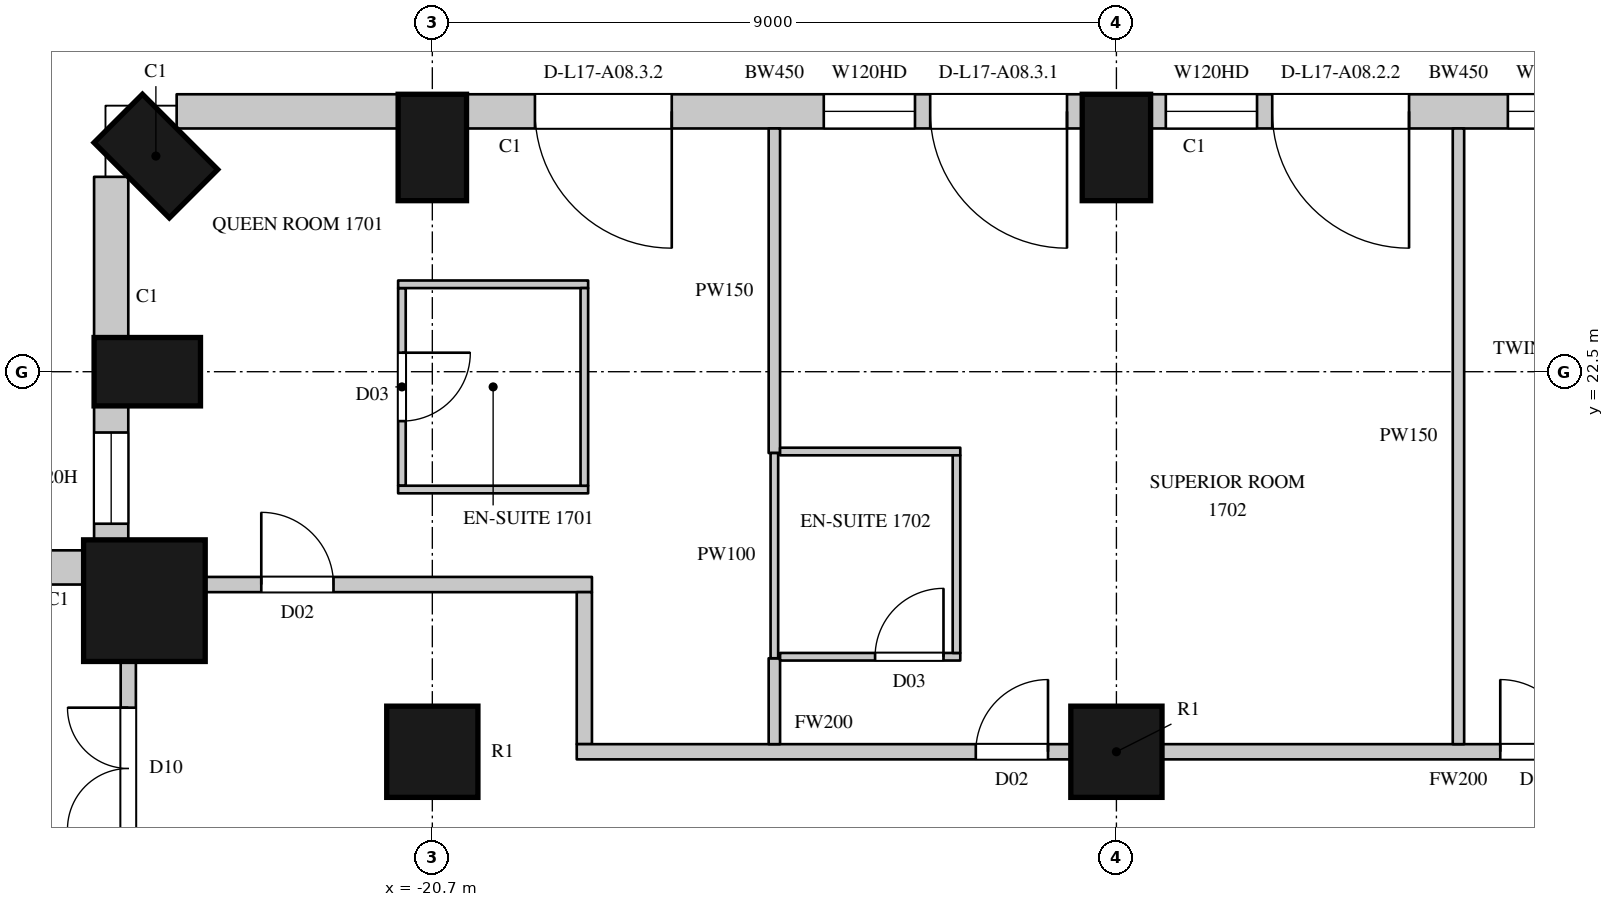
"""IFC4 building model, lengths in metres.
Left out: names, types, materials, properties, quantities, classifications, styles, units other than length and angle.
Written with IfcOpenShell. Run it as: python <this file> out.ifc"""

import sys

from ifc_helpers import new_model, si_unit, direction, frame, frame_2d, origin, origin_2d, place, context, subcontext, project, spatial, rectangle, circle, extrude, element, fill, save


model = new_model("IFC4")
c1 = context("Model", 3, precision=1e-05, world=origin(), true_north=direction((0.0, 1.0)))
c2 = subcontext(c1, "Body", "Model", "MODEL_VIEW")
j1 = project(units=[si_unit("LENGTHUNIT", "METRE"), si_unit("PLANEANGLEUNIT", "RADIAN")], contexts=[c1])
p1 = place(None, origin())
s1 = spatial("IfcSite", under=j1, at=p1, CompositionType="ELEMENT")
p2 = place(p1, origin())
s2 = spatial("IfcBuilding", under=s1, at=p2, CompositionType="ELEMENT")
p3 = place(p2, frame((0.0, 0.0, 91.5)))
s3 = spatial("IfcBuildingStorey", under=s2, at=p3, CompositionType="ELEMENT", Elevation=91.5)
for number, where, z_axis, x_axis in (
    (1, (-11.7, 25.45, 0.0), (0.0, 0.0, 1.0), (-1.0, 0.0, 0.0)),
    (2, (-20.7, 25.45, 0.0), (0.0, 0.0, 1.0), (-1.0, 0.0, 0.0)),
    (3, (-24.337, 25.337, 0.0), (0.0, 0.0, 1.0), (-0.707, -0.707, 0.0)),
    (4, (-24.45, 22.5, 0.0), (0.0, 0.0, 1.0), (0.0, -1.0, 0.0)),
):
    element("IfcColumn", number, at=place(p3, frame(where, z_axis=z_axis, x_axis=x_axis)), inside=s3, PredefinedType="COLUMN", context=c2, shape_type="SweptSolid", body=[
        extrude(rectangle(XDim=0.9, YDim=1.4, at=origin_2d()), origin(), (0.0, 0.0, 1.0), 3.6),
    ])
p4 = place(p3, frame((-24.488, 19.488, 0.0), z_axis=(0.0, 0.0, 1.0), x_axis=(1.0, 0.0, 0.0)))
e5 = element("IfcColumn", 5, at=p4, inside=s3, PredefinedType="COLUMN", context=c2, shape_type="SweptSolid", body=[
    extrude(circle(Radius=0.8, at=origin_2d()), origin(), (0.0, 0.0, 1.0), 3.6),
])
for number, where, z_axis, x_axis in (
    (6, (-20.7, 17.5, 0.0), (0.0, 0.0, 1.0), (1.0, 0.0, 0.0)),
    (7, (-11.7, 17.5, 0.0), (0.0, 0.0, 1.0), (1.0, 0.0, 0.0)),
):
    element("IfcColumn", number, at=place(p3, frame(where, z_axis=z_axis, x_axis=x_axis)), inside=s3, PredefinedType="COLUMN", context=c2, shape_type="SweptSolid", body=[
        extrude(circle(Radius=0.6, at=origin_2d()), origin(), (0.0, 0.0, 1.0), 3.6),
    ])
p5 = place(p3, frame((-3.15, 25.925, 0.0), z_axis=(0.0, 0.0, 1.0), x_axis=(-1.0, 0.0, 0.0)))
e8 = element("IfcWall", 8, at=p5, inside=s3, PredefinedType="SOLIDWALL", context=c2, shape_type="SweptSolid", body=[
    extrude(rectangle(XDim=8.1, YDim=0.45, at=frame_2d((4.05, 0.0))), origin(), (0.0, 0.0, 1.0), 3.3),
])
p6 = place(p5, frame((0.2, 0.0, 0.0)))
e9 = element("IfcOpeningElement", 9, at=p6, cuts=e8, PredefinedType="OPENING", context=c2, shape_type="SweptSolid", body=[
    extrude(rectangle(XDim=1.8, YDim=2.4, at=frame_2d((0.9, 1.2))), frame((0.0, 0.235, 0.0), z_axis=(0.0, -1.0, 0.0), x_axis=(1.0, 0.0, 0.0)), (0.0, 0.0, 1.0), 0.47),
])
p7 = place(p5, frame((2.2, 0.0, 1.05)))
e10 = element("IfcOpeningElement", 10, at=p7, cuts=e8, PredefinedType="OPENING", context=c2, shape_type="SweptSolid", body=[
    extrude(rectangle(XDim=1.2, YDim=2.0, at=frame_2d((0.6, 1.0))), frame((0.0, 0.235, 0.0), z_axis=(0.0, -1.0, 0.0), x_axis=(1.0, 0.0, 0.0)), (0.0, 0.0, 1.0), 0.47),
])
p8 = place(p5, frame((4.7, 0.0, 0.0)))
e11 = element("IfcOpeningElement", 11, at=p8, cuts=e8, PredefinedType="OPENING", context=c2, shape_type="SweptSolid", body=[
    extrude(rectangle(XDim=1.8, YDim=2.4, at=frame_2d((0.9, 1.2))), frame((0.0, 0.235, 0.0), z_axis=(0.0, -1.0, 0.0), x_axis=(1.0, 0.0, 0.0)), (0.0, 0.0, 1.0), 0.47),
])
p9 = place(p5, frame((6.7, 0.0, 1.05)))
e12 = element("IfcOpeningElement", 12, at=p9, cuts=e8, PredefinedType="OPENING", context=c2, shape_type="SweptSolid", body=[
    extrude(rectangle(XDim=1.2, YDim=2.0, at=frame_2d((0.6, 1.0))), frame((0.0, 0.235, 0.0), z_axis=(0.0, -1.0, 0.0), x_axis=(1.0, 0.0, 0.0)), (0.0, 0.0, 1.0), 0.47),
])
p10 = place(p3, frame((-12.15, 25.925, 0.0), z_axis=(0.0, 0.0, 1.0), x_axis=(-1.0, 0.0, 0.0)))
e13 = element("IfcWall", 13, at=p10, inside=s3, PredefinedType="SOLIDWALL", context=c2, shape_type="SweptSolid", body=[
    extrude(rectangle(XDim=8.1, YDim=0.45, at=frame_2d((4.05, 0.0))), origin(), (0.0, 0.0, 1.0), 3.3),
])
p11 = place(p10, frame((0.2, 0.0, 0.0)))
e14 = element("IfcOpeningElement", 14, at=p11, cuts=e13, PredefinedType="OPENING", context=c2, shape_type="SweptSolid", body=[
    extrude(rectangle(XDim=1.8, YDim=2.4, at=frame_2d((0.9, 1.2))), frame((0.0, 0.235, 0.0), z_axis=(0.0, -1.0, 0.0), x_axis=(1.0, 0.0, 0.0)), (0.0, 0.0, 1.0), 0.47),
])
p12 = place(p10, frame((2.2, 0.0, 1.05)))
e15 = element("IfcOpeningElement", 15, at=p12, cuts=e13, PredefinedType="OPENING", context=c2, shape_type="SweptSolid", body=[
    extrude(rectangle(XDim=1.2, YDim=2.0, at=frame_2d((0.6, 1.0))), frame((0.0, 0.235, 0.0), z_axis=(0.0, -1.0, 0.0), x_axis=(1.0, 0.0, 0.0)), (0.0, 0.0, 1.0), 0.47),
])
p13 = place(p10, frame((5.4, 0.0, 0.0)))
e16 = element("IfcOpeningElement", 16, at=p13, cuts=e13, PredefinedType="OPENING", context=c2, shape_type="SweptSolid", body=[
    extrude(rectangle(XDim=1.8, YDim=2.4, at=frame_2d((0.9, 1.2))), frame((0.0, 0.235, 0.0), z_axis=(0.0, -1.0, 0.0), x_axis=(1.0, 0.0, 0.0)), (0.0, 0.0, 1.0), 0.47),
])
p14 = place(p3, frame((-21.15, 25.925, 0.0), z_axis=(0.0, 0.0, 1.0), x_axis=(-1.0, 0.0, 0.0)))
e17 = element("IfcWall", 17, at=p14, inside=s3, PredefinedType="SOLIDWALL", context=c2, shape_type="SweptSolid", body=[
    extrude(rectangle(XDim=2.914, YDim=0.45, at=frame_2d((1.457, 0.0))), origin(), (0.0, 0.0, 1.0), 3.3),
])
p15 = place(p3, frame((-24.925, 25.064, 0.0), z_axis=(0.0, 0.0, 1.0), x_axis=(0.0, -1.0, 0.0)))
e18 = element("IfcWall", 18, at=p15, inside=s3, PredefinedType="SOLIDWALL", context=c2, shape_type="SweptSolid", body=[
    extrude(rectangle(XDim=2.114, YDim=0.45, at=frame_2d((1.057, 0.0))), origin(), (0.0, 0.0, 1.0), 3.3),
])
p16 = place(p3, frame((-24.925, 22.05, 0.0), z_axis=(0.0, 0.0, 1.0), x_axis=(0.0, -1.0, 0.0)))
e19 = element("IfcWall", 19, at=p16, inside=s3, PredefinedType="SOLIDWALL", context=c2, shape_type="SweptSolid", body=[
    extrude(rectangle(XDim=1.792, YDim=0.45, at=frame_2d((0.896, 0.0))), origin(), (0.0, 0.0, 1.0), 3.3),
])
p17 = place(p16, frame((0.35, 0.0, 1.05)))
e20 = element("IfcOpeningElement", 20, at=p17, cuts=e19, PredefinedType="OPENING", context=c2, shape_type="SweptSolid", body=[
    extrude(rectangle(XDim=1.2, YDim=2.0, at=frame_2d((0.6, 1.0))), frame((0.0, 0.235, 0.0), z_axis=(0.0, -1.0, 0.0), x_axis=(1.0, 0.0, 0.0)), (0.0, 0.0, 1.0), 0.47),
])
p18 = place(p3, frame((-25.259, 19.925, 0.0), z_axis=(0.0, 0.0, 1.0), x_axis=(-1.0, 0.0, 0.0)))
e21 = element("IfcWall", 21, at=p18, inside=s3, PredefinedType="SOLIDWALL", context=c2, shape_type="SweptSolid", body=[
    extrude(rectangle(XDim=3.805, YDim=0.45, at=frame_2d((1.903, 0.0))), origin(), (0.0, 0.0, 1.0), 3.3),
])
p19 = place(p18, frame((0.592, 0.0, 1.05)))
e22 = element("IfcOpeningElement", 22, at=p19, cuts=e21, PredefinedType="OPENING", context=c2, shape_type="SweptSolid", body=[
    extrude(rectangle(XDim=2.7, YDim=2.0, at=frame_2d((1.35, 1.0))), frame((0.0, 0.235, 0.0), z_axis=(0.0, -1.0, 0.0), x_axis=(1.0, 0.0, 0.0)), (0.0, 0.0, 1.0), 0.47),
])
p20 = place(p3, frame((-24.7, 16.03, 0.0), z_axis=(0.0, 0.0, 1.0), x_axis=(0.0, 1.0, 0.0)))
e23 = element("IfcWall", 23, at=p20, inside=s3, PredefinedType="PARTITIONING", context=c2, shape_type="SweptSolid", body=[
    extrude(rectangle(XDim=2.67, YDim=0.2, at=frame_2d((1.335, 0.0))), origin(), (0.0, 0.0, 1.0), 3.3),
])
p21 = place(p20, frame((0.45, 0.0, 0.0)))
e24 = element("IfcOpeningElement", 24, at=p21, cuts=e23, PredefinedType="OPENING", context=c2, shape_type="SweptSolid", body=[
    extrude(rectangle(XDim=1.6, YDim=2.4, at=frame_2d((0.8, 1.2))), frame((0.0, 0.11, 0.0), z_axis=(0.0, -1.0, 0.0), x_axis=(1.0, 0.0, 0.0)), (0.0, 0.0, 1.0), 0.22),
])
p22 = place(p3, frame((-23.7, 19.7, 0.0), z_axis=(0.0, 0.0, 1.0), x_axis=(1.0, 0.0, 0.0)))
e25 = element("IfcWall", 25, at=p22, inside=s3, PredefinedType="PARTITIONING", context=c2, shape_type="SweptSolid", body=[
    extrude(rectangle(XDim=5.1, YDim=0.2, at=frame_2d((2.55, 0.0))), origin(), (0.0, 0.0, 1.0), 3.3),
])
p23 = place(p22, frame((0.75, 0.0, 0.0)))
e26 = element("IfcOpeningElement", 26, at=p23, cuts=e25, PredefinedType="OPENING", context=c2, shape_type="SweptSolid", body=[
    extrude(rectangle(XDim=0.95, YDim=2.2, at=frame_2d((0.475, 1.1))), frame((0.0, 0.11, 0.0), z_axis=(0.0, -1.0, 0.0), x_axis=(1.0, 0.0, 0.0)), (0.0, 0.0, 1.0), 0.22),
])
p24 = place(p3, frame((-18.7, 17.6, 0.0), z_axis=(0.0, 0.0, 1.0), x_axis=(0.0, 1.0, 0.0)))
e27 = element("IfcWall", 27, at=p24, inside=s3, PredefinedType="PARTITIONING", context=c2, shape_type="SweptSolid", body=[
    extrude(rectangle(XDim=2.0, YDim=0.2, at=frame_2d((1.0, 0.0))), origin(), (0.0, 0.0, 1.0), 3.3),
])
p25 = place(p3, frame((-18.8, 17.5, 0.0), z_axis=(0.0, 0.0, 1.0), x_axis=(1.0, 0.0, 0.0)))
e28 = element("IfcWall", 28, at=p25, inside=s3, PredefinedType="PARTITIONING", context=c2, shape_type="SweptSolid", body=[
    extrude(rectangle(XDim=6.5, YDim=0.2, at=frame_2d((3.25, 0.0))), origin(), (0.0, 0.0, 1.0), 2.75),
])
p26 = place(p25, frame((5.25, 0.0, 0.0)))
e29 = element("IfcOpeningElement", 29, at=p26, cuts=e28, PredefinedType="OPENING", context=c2, shape_type="SweptSolid", body=[
    extrude(rectangle(XDim=0.95, YDim=2.2, at=frame_2d((0.475, 1.1))), frame((0.0, 0.11, 0.0), z_axis=(0.0, -1.0, 0.0), x_axis=(1.0, 0.0, 0.0)), (0.0, 0.0, 1.0), 0.22),
])
p27 = place(p3, frame((-11.1, 17.5, 0.0), z_axis=(0.0, 0.0, 1.0), x_axis=(1.0, 0.0, 0.0)))
e30 = element("IfcWall", 30, at=p27, inside=s3, PredefinedType="PARTITIONING", context=c2, shape_type="SweptSolid", body=[
    extrude(rectangle(XDim=7.8, YDim=0.2, at=frame_2d((3.9, 0.0))), origin(), (0.0, 0.0, 1.0), 2.75),
])
p28 = place(p27, frame((4.45, 0.0, 0.0)))
e31 = element("IfcOpeningElement", 31, at=p28, cuts=e30, PredefinedType="OPENING", context=c2, shape_type="SweptSolid", body=[
    extrude(rectangle(XDim=0.95, YDim=2.2, at=frame_2d((0.475, 1.1))), frame((0.0, 0.11, 0.0), z_axis=(0.0, -1.0, 0.0), x_axis=(1.0, 0.0, 0.0)), (0.0, 0.0, 1.0), 0.22),
])
p29 = place(p3, frame((-16.2, 17.6, 0.0), z_axis=(0.0, 0.0, 1.0), x_axis=(0.0, 1.0, 0.0)))
e32 = element("IfcWall", 32, at=p29, inside=s3, PredefinedType="PARTITIONING", context=c2, shape_type="SweptSolid", body=[
    extrude(rectangle(XDim=1.13, YDim=0.15, at=frame_2d((0.565, 0.0))), origin(), (0.0, 0.0, 1.0), 2.65),
])
p30 = place(p3, frame((-16.2, 21.43, 0.0), z_axis=(0.0, 0.0, 1.0), x_axis=(0.0, 1.0, 0.0)))
e33 = element("IfcWall", 33, at=p30, inside=s3, PredefinedType="PARTITIONING", context=c2, shape_type="SweptSolid", body=[
    extrude(rectangle(XDim=4.27, YDim=0.15, at=frame_2d((2.135, 0.0))), origin(), (0.0, 0.0, 1.0), 2.65),
])
p31 = place(p3, frame((-7.2, 17.6, 0.0), z_axis=(0.0, 0.0, 1.0), x_axis=(0.0, 1.0, 0.0)))
e34 = element("IfcWall", 34, at=p31, inside=s3, PredefinedType="PARTITIONING", context=c2, shape_type="SweptSolid", body=[
    extrude(rectangle(XDim=8.1, YDim=0.15, at=frame_2d((4.05, 0.0))), origin(), (0.0, 0.0, 1.0), 2.65),
])
p32 = place(p3, frame((-21.1, 21.0, 0.0), z_axis=(0.0, 0.0, 1.0), x_axis=(0.0, 1.0, 0.0)))
e35 = element("IfcWall", 35, at=p32, inside=s3, PredefinedType="PARTITIONING", context=c2, shape_type="SweptSolid", body=[
    extrude(rectangle(XDim=2.6, YDim=0.1, at=frame_2d((1.3, 0.0))), origin(), (0.0, 0.0, 1.0), 3.3),
])
p33 = place(p32, frame((0.85, 0.0, 0.0)))
e36 = element("IfcOpeningElement", 36, at=p33, cuts=e35, PredefinedType="OPENING", context=c2, shape_type="SweptSolid", body=[
    extrude(rectangle(XDim=0.9, YDim=2.2, at=frame_2d((0.45, 1.1))), frame((0.0, 0.06, 0.0), z_axis=(0.0, -1.0, 0.0), x_axis=(1.0, 0.0, 0.0)), (0.0, 0.0, 1.0), 0.12),
])
for number, where, z_axis, x_axis in (
    (37, (-21.15, 20.95, 0.0), (0.0, 0.0, 1.0), (1.0, 0.0, 0.0)),
    (38, (-21.15, 23.65, 0.0), (0.0, 0.0, 1.0), (1.0, 0.0, 0.0)),
):
    element("IfcWall", number, at=place(p3, frame(where, z_axis=z_axis, x_axis=x_axis)), inside=s3, PredefinedType="PARTITIONING", context=c2, shape_type="SweptSolid", body=[
        extrude(rectangle(XDim=2.5, YDim=0.1, at=frame_2d((1.25, 0.0))), origin(), (0.0, 0.0, 1.0), 3.3),
    ])
p34 = place(p3, frame((-18.7, 21.0, 0.0), z_axis=(0.0, 0.0, 1.0), x_axis=(0.0, 1.0, 0.0)))
e39 = element("IfcWall", 39, at=p34, inside=s3, PredefinedType="PARTITIONING", context=c2, shape_type="SweptSolid", body=[
    extrude(rectangle(XDim=2.6, YDim=0.1, at=frame_2d((1.3, 0.0))), origin(), (0.0, 0.0, 1.0), 3.3),
])
p35 = place(p3, frame((-16.2, 18.73, 0.0), z_axis=(0.0, 0.0, 1.0), x_axis=(0.0, 1.0, 0.0)))
e40 = element("IfcWall", 40, at=p35, inside=s3, PredefinedType="PARTITIONING", context=c2, shape_type="SweptSolid", body=[
    extrude(rectangle(XDim=2.7, YDim=0.1, at=frame_2d((1.35, 0.0))), origin(), (0.0, 0.0, 1.0), 2.65),
])
p36 = place(p3, frame((-16.125, 18.75, 0.0), z_axis=(0.0, 0.0, 1.0), x_axis=(1.0, 0.0, 0.0)))
e41 = element("IfcWall", 41, at=p36, inside=s3, PredefinedType="PARTITIONING", context=c2, shape_type="SweptSolid", body=[
    extrude(rectangle(XDim=2.371, YDim=0.1, at=frame_2d((1.186, 0.0))), origin(), (0.0, 0.0, 1.0), 3.3),
])
p37 = place(p36, frame((1.25, 0.0, 0.0)))
e42 = element("IfcOpeningElement", 42, at=p37, cuts=e41, PredefinedType="OPENING", context=c2, shape_type="SweptSolid", body=[
    extrude(rectangle(XDim=0.9, YDim=2.2, at=frame_2d((0.45, 1.1))), frame((0.0, 0.06, 0.0), z_axis=(0.0, -1.0, 0.0), x_axis=(1.0, 0.0, 0.0)), (0.0, 0.0, 1.0), 0.12),
])
p38 = place(p3, frame((-16.125, 21.45, 0.0), z_axis=(0.0, 0.0, 1.0), x_axis=(1.0, 0.0, 0.0)))
e43 = element("IfcWall", 43, at=p38, inside=s3, PredefinedType="PARTITIONING", context=c2, shape_type="SweptSolid", body=[
    extrude(rectangle(XDim=2.371, YDim=0.1, at=frame_2d((1.186, 0.0))), origin(), (0.0, 0.0, 1.0), 3.3),
])
p39 = place(p3, frame((-13.804, 18.8, 0.0), z_axis=(0.0, 0.0, 1.0), x_axis=(0.0, 1.0, 0.0)))
e44 = element("IfcWall", 44, at=p39, inside=s3, PredefinedType="PARTITIONING", context=c2, shape_type="SweptSolid", body=[
    extrude(rectangle(XDim=2.6, YDim=0.1, at=frame_2d((1.3, 0.0))), origin(), (0.0, 0.0, 1.0), 3.3),
])
p40 = place(p7, origin())
e45 = element("IfcWindow", 45, at=p40, inside=s3, PartitioningType="SINGLE_PANEL", PredefinedType="WINDOW", context=c2, shape_type="SweptSolid", body=[
    extrude(rectangle(XDim=1.2, YDim=2.0, at=frame_2d((0.6, 1.0))), frame((0.0, 0.135, 0.0), z_axis=(0.0, -1.0, 0.0), x_axis=(1.0, 0.0, 0.0)), (0.0, 0.0, 1.0), 0.06),
])
fill(e10, e45)
p41 = place(p8, origin())
e46 = element("IfcDoor", 46, at=p41, inside=s3, OperationType="SLIDING_TO_LEFT", PredefinedType="DOOR", context=c2, shape_type="SweptSolid", body=[
    extrude(rectangle(XDim=1.8, YDim=2.4, at=frame_2d((0.9, 1.2))), frame((0.0, 0.13, 0.0), z_axis=(0.0, -1.0, 0.0), x_axis=(1.0, 0.0, 0.0)), (0.0, 0.0, 1.0), 0.05),
])
fill(e11, e46)
p42 = place(p9, origin())
e47 = element("IfcWindow", 47, at=p42, inside=s3, PartitioningType="SINGLE_PANEL", PredefinedType="WINDOW", context=c2, shape_type="SweptSolid", body=[
    extrude(rectangle(XDim=1.2, YDim=2.0, at=frame_2d((0.6, 1.0))), frame((0.0, 0.135, 0.0), z_axis=(0.0, -1.0, 0.0), x_axis=(1.0, 0.0, 0.0)), (0.0, 0.0, 1.0), 0.06),
])
fill(e12, e47)
p43 = place(p11, origin())
e48 = element("IfcDoor", 48, at=p43, inside=s3, OperationType="SLIDING_TO_LEFT", PredefinedType="DOOR", context=c2, shape_type="SweptSolid", body=[
    extrude(rectangle(XDim=1.8, YDim=2.4, at=frame_2d((0.9, 1.2))), frame((0.0, 0.13, 0.0), z_axis=(0.0, -1.0, 0.0), x_axis=(1.0, 0.0, 0.0)), (0.0, 0.0, 1.0), 0.05),
])
fill(e14, e48)
p44 = place(p12, origin())
e49 = element("IfcWindow", 49, at=p44, inside=s3, PartitioningType="SINGLE_PANEL", PredefinedType="WINDOW", context=c2, shape_type="SweptSolid", body=[
    extrude(rectangle(XDim=1.2, YDim=2.0, at=frame_2d((0.6, 1.0))), frame((0.0, 0.135, 0.0), z_axis=(0.0, -1.0, 0.0), x_axis=(1.0, 0.0, 0.0)), (0.0, 0.0, 1.0), 0.06),
])
fill(e15, e49)
p45 = place(p13, origin())
e50 = element("IfcDoor", 50, at=p45, inside=s3, OperationType="SLIDING_TO_LEFT", PredefinedType="DOOR", context=c2, shape_type="SweptSolid", body=[
    extrude(rectangle(XDim=1.8, YDim=2.4, at=frame_2d((0.9, 1.2))), frame((0.0, 0.13, 0.0), z_axis=(0.0, -1.0, 0.0), x_axis=(1.0, 0.0, 0.0)), (0.0, 0.0, 1.0), 0.05),
])
fill(e16, e50)
p46 = place(p17, origin())
e51 = element("IfcWindow", 51, at=p46, inside=s3, PartitioningType="SINGLE_PANEL", PredefinedType="WINDOW", context=c2, shape_type="SweptSolid", body=[
    extrude(rectangle(XDim=1.2, YDim=2.0, at=frame_2d((0.6, 1.0))), frame((0.0, 0.135, 0.0), z_axis=(0.0, -1.0, 0.0), x_axis=(1.0, 0.0, 0.0)), (0.0, 0.0, 1.0), 0.06),
])
fill(e20, e51)
p47 = place(p21, origin())
e52 = element("IfcDoor", 52, at=p47, inside=s3, OperationType="DOUBLE_DOOR_SINGLE_SWING", PredefinedType="DOOR", context=c2, shape_type="SweptSolid", body=[
    extrude(rectangle(XDim=1.6, YDim=2.4, at=frame_2d((0.8, 1.2))), frame((0.0, 0.025, 0.0), z_axis=(0.0, -1.0, 0.0), x_axis=(1.0, 0.0, 0.0)), (0.0, 0.0, 1.0), 0.05),
])
fill(e24, e52)
p48 = place(p23, origin())
e53 = element("IfcDoor", 53, at=p48, inside=s3, OperationType="SINGLE_SWING_LEFT", PredefinedType="DOOR", context=c2, shape_type="SweptSolid", body=[
    extrude(rectangle(XDim=0.95, YDim=2.2, at=frame_2d((0.475, 1.1))), frame((0.0, 0.025, 0.0), z_axis=(0.0, -1.0, 0.0), x_axis=(1.0, 0.0, 0.0)), (0.0, 0.0, 1.0), 0.05),
])
fill(e26, e53)
p49 = place(p33, origin())
e54 = element("IfcDoor", 54, at=p49, inside=s3, OperationType="SINGLE_SWING_LEFT", PredefinedType="DOOR", context=c2, shape_type="SweptSolid", body=[
    extrude(rectangle(XDim=0.9, YDim=2.2, at=frame_2d((0.45, 1.1))), frame((0.0, 0.025, 0.0), z_axis=(0.0, -1.0, 0.0), x_axis=(1.0, 0.0, 0.0)), (0.0, 0.0, 1.0), 0.05),
])
fill(e36, e54)
p50 = place(p26, origin())
e55 = element("IfcDoor", 55, at=p50, inside=s3, OperationType="SINGLE_SWING_RIGHT", PredefinedType="DOOR", context=c2, shape_type="SweptSolid", body=[
    extrude(rectangle(XDim=0.95, YDim=2.2, at=frame_2d((0.475, 1.1))), frame((0.0, 0.025, 0.0), z_axis=(0.0, -1.0, 0.0), x_axis=(1.0, 0.0, 0.0)), (0.0, 0.0, 1.0), 0.05),
])
fill(e29, e55)
p51 = place(p37, origin())
e56 = element("IfcDoor", 56, at=p51, inside=s3, OperationType="SINGLE_SWING_RIGHT", PredefinedType="DOOR", context=c2, shape_type="SweptSolid", body=[
    extrude(rectangle(XDim=0.9, YDim=2.2, at=frame_2d((0.45, 1.1))), frame((0.0, 0.025, 0.0), z_axis=(0.0, -1.0, 0.0), x_axis=(1.0, 0.0, 0.0)), (0.0, 0.0, 1.0), 0.05),
])
fill(e42, e56)
p52 = place(p28, origin())
e57 = element("IfcDoor", 57, at=p52, inside=s3, OperationType="SINGLE_SWING_LEFT", PredefinedType="DOOR", context=c2, shape_type="SweptSolid", body=[
    extrude(rectangle(XDim=0.95, YDim=2.2, at=frame_2d((0.475, 1.1))), frame((0.0, 0.025, 0.0), z_axis=(0.0, -1.0, 0.0), x_axis=(1.0, 0.0, 0.0)), (0.0, 0.0, 1.0), 0.05),
])
fill(e31, e57)
save(model, sys.argv[1])
